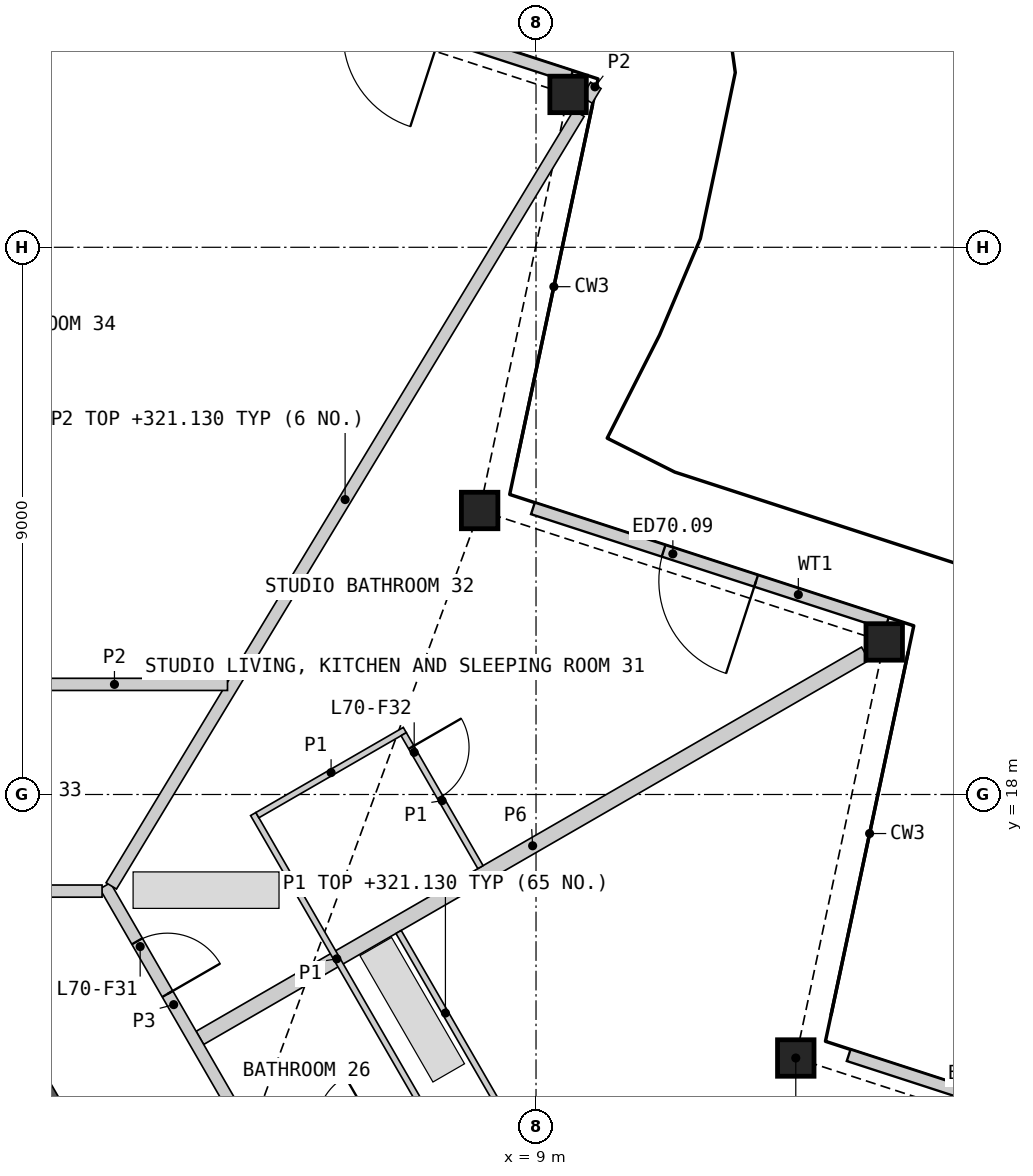
"""IFC4 building model, lengths in metres.
Left out: names, types, materials, properties, quantities, classifications, styles, units other than length and angle.
Written with IfcOpenShell. Run it as: python <this file> out.ifc"""

import sys

from ifc_helpers import new_model, si_unit, direction, frame, frame_2d, origin, origin_2d, place, context, subcontext, project, spatial, rectangle, hollow_rectangle, extrude, element, fill, save


model = new_model("IFC4")
c1 = context("Model", 3, precision=1e-05, world=origin(), true_north=direction((0.0, 1.0)))
c2 = subcontext(c1, "Body", "Model", "MODEL_VIEW")
j1 = project(units=[si_unit("LENGTHUNIT", "METRE"), si_unit("PLANEANGLEUNIT", "RADIAN")], contexts=[c1])
p1 = place(None, origin())
s1 = spatial("IfcSite", under=j1, at=p1, CompositionType="ELEMENT")
p2 = place(p1, origin())
s2 = spatial("IfcBuilding", under=s1, at=p2, CompositionType="ELEMENT")
p3 = place(p2, frame((0.0, 0.0, 318.8)))
s3 = spatial("IfcBuildingStorey", under=s2, at=p3, CompositionType="ELEMENT", Elevation=318.8)
for number, where, z_axis, x_axis in (
    (1, (13.272, 13.666, 0.0), (0.0, 0.0, 1.0), (1.0, 0.0, 0.0)),
    (2, (14.727, 20.509, 0.0), (0.0, 0.0, 1.0), (1.0, 0.0, 0.0)),
    (3, (8.073, 22.671, 0.0), (0.0, 0.0, 1.0), (1.0, 0.0, 0.0)),
    (4, (9.527, 29.514, 0.0), (0.0, 0.0, 1.0), (1.0, 0.0, 0.0)),
):
    element("IfcColumn", number, at=place(p3, frame(where, z_axis=z_axis, x_axis=x_axis)), inside=s3, PredefinedType="COLUMN", context=c2, shape_type="SweptSolid", body=[
        extrude(hollow_rectangle(XDim=0.6, YDim=0.6, WallThickness=0.04, at=origin_2d()), origin(), (0.0, 0.0, 1.0), 3.4),
    ])
p4 = place(p3, frame((19.962, 11.82, 0.0), z_axis=(0.0, 0.0, 1.0), x_axis=(-0.951053709789, 0.309025631781, 0.0)))
e5 = element("IfcWall", 5, at=p4, inside=s3, PredefinedType="SOLIDWALL", context=c2, shape_type="SweptSolid", body=[
    extrude(rectangle(XDim=6.12, YDim=0.2, at=frame_2d((3.06, 0.0))), origin(), (0.0, 0.0, 1.0), 2.488),
])
p5 = place(p4, frame((2.26, 0.0, 0.0)))
e6 = element("IfcOpeningElement", 6, at=p5, cuts=e5, PredefinedType="OPENING", context=c2, shape_type="SweptSolid", body=[
    extrude(rectangle(XDim=1.6, YDim=2.25, at=frame_2d((0.8, 1.125))), frame((0.0, 0.11, 0.0), z_axis=(0.0, -1.0, 0.0), x_axis=(1.0, 0.0, 0.0)), (0.0, 0.0, 1.0), 0.22),
])
p6 = place(p3, frame((14.769, 20.814, 0.0), z_axis=(0.0, 0.0, 1.0), x_axis=(-0.951069243123, 0.308977822483, 0.0)))
e7 = element("IfcWall", 7, at=p6, inside=s3, PredefinedType="SOLIDWALL", context=c2, shape_type="SweptSolid", body=[
    extrude(rectangle(XDim=6.12, YDim=0.2, at=frame_2d((3.06, 0.0))), origin(), (0.0, 0.0, 1.0), 2.488),
])
p7 = place(p6, frame((2.26, 0.0, 0.0)))
e8 = element("IfcOpeningElement", 8, at=p7, cuts=e7, PredefinedType="OPENING", context=c2, shape_type="SweptSolid", body=[
    extrude(rectangle(XDim=1.6, YDim=2.25, at=frame_2d((0.8, 1.125))), frame((0.0, 0.11, 0.0), z_axis=(0.0, -1.0, 0.0), x_axis=(1.0, 0.0, 0.0)), (0.0, 0.0, 1.0), 0.22),
])
p8 = place(p3, frame((9.576, 29.809, 0.0), z_axis=(0.0, 0.0, 1.0), x_axis=(-0.951053709789, 0.309025631781, 0.0)))
e9 = element("IfcWall", 9, at=p8, inside=s3, PredefinedType="SOLIDWALL", context=c2, shape_type="SweptSolid", body=[
    extrude(rectangle(XDim=6.12, YDim=0.2, at=frame_2d((3.06, 0.0))), origin(), (0.0, 0.0, 1.0), 2.488),
])
p9 = place(p8, frame((2.26, 0.0, 0.0)))
e10 = element("IfcOpeningElement", 10, at=p9, cuts=e9, PredefinedType="OPENING", context=c2, shape_type="SweptSolid", body=[
    extrude(rectangle(XDim=1.6, YDim=2.25, at=frame_2d((0.8, 1.125))), frame((0.0, 0.11, 0.0), z_axis=(0.0, -1.0, 0.0), x_axis=(1.0, 0.0, 0.0)), (0.0, 0.0, 1.0), 0.22),
])
p10 = place(p3, frame((2.361, 10.322, 0.0), z_axis=(0.0, 0.0, 1.0), x_axis=(-0.500000735859, 0.866024978935, 0.0)))
e11 = element("IfcWall", 11, at=p10, inside=s3, PredefinedType="SHEAR", context=c2, shape_type="SweptSolid", body=[
    extrude(rectangle(XDim=4.202, YDim=0.6, at=frame_2d((2.101, 0.0))), origin(), (0.0, 0.0, 1.0), 3.1),
])
p11 = place(p3, frame((3.472, 13.997, 0.0), z_axis=(0.0, 0.0, 1.0), x_axis=(0.866029233976, 0.499993365855, 0.0)))
e12 = element("IfcWall", 12, at=p11, inside=s3, PredefinedType="PARTITIONING", context=c2, shape_type="SweptSolid", body=[
    extrude(rectangle(XDim=12.637, YDim=0.25, at=frame_2d((6.319, 0.0))), origin(), (0.0, 0.0, 1.0), 2.33),
])
p12 = place(p3, frame((1.913, 16.498, 0.0), z_axis=(0.0, 0.0, 1.0), x_axis=(0.499950370306, -0.866054055606, 0.0)))
e13 = element("IfcWall", 13, at=p12, inside=s3, PredefinedType="PARTITIONING", context=c2, shape_type="SweptSolid", body=[
    extrude(rectangle(XDim=4.513, YDim=0.2, at=frame_2d((2.256, 0.0))), origin(), (0.0, 0.0, 1.0), 3.1),
])
p13 = place(p12, frame((1.053, 0.0, 0.0)))
e14 = element("IfcOpeningElement", 14, at=p13, cuts=e13, PredefinedType="OPENING", context=c2, shape_type="SweptSolid", body=[
    extrude(rectangle(XDim=1.0, YDim=2.1, at=frame_2d((0.5, 1.05))), frame((0.0, 0.11, 0.0), z_axis=(0.0, -1.0, 0.0), x_axis=(1.0, 0.0, 0.0)), (0.0, 0.0, 1.0), 0.22),
])
p14 = place(p3, frame((-1.863, 16.411, 0.0), z_axis=(0.0, 0.0, 1.0), x_axis=(1.0, 0.0, 0.0)))
e15 = element("IfcWall", 15, at=p14, inside=s3, PredefinedType="PARTITIONING", context=c2, shape_type="SweptSolid", body=[
    extrude(rectangle(XDim=3.726, YDim=0.2, at=frame_2d((1.863, 0.0))), origin(), (0.0, 0.0, 1.0), 3.1),
])
p15 = place(p14, frame((1.388, 0.0, 0.0)))
e16 = element("IfcOpeningElement", 16, at=p15, cuts=e15, PredefinedType="OPENING", context=c2, shape_type="SweptSolid", body=[
    extrude(rectangle(XDim=0.95, YDim=2.1, at=frame_2d((0.475, 1.05))), frame((0.0, 0.11, 0.0), z_axis=(0.0, -1.0, 0.0), x_axis=(1.0, 0.0, 0.0)), (0.0, 0.0, 1.0), 0.22),
])
p16 = place(p3, frame((2.015, 16.497, 0.0), z_axis=(0.0, 0.0, 1.0), x_axis=(0.517779253395, 0.855514257482, 0.0)))
e17 = element("IfcWall", 17, at=p16, inside=s3, PredefinedType="PARTITIONING", context=c2, shape_type="SweptSolid", body=[
    extrude(rectangle(XDim=14.854, YDim=0.2, at=frame_2d((7.427, 0.0))), origin(), (0.0, 0.0, 1.0), 2.33),
])
p17 = place(p3, frame((0.208, 19.811, 0.0), z_axis=(0.0, 0.0, 1.0), x_axis=(1.0, 0.0, 0.0)))
e18 = element("IfcWall", 18, at=p17, inside=s3, PredefinedType="PARTITIONING", context=c2, shape_type="SweptSolid", body=[
    extrude(rectangle(XDim=3.718, YDim=0.2, at=frame_2d((1.859, 0.0))), origin(), (0.0, 0.0, 1.0), 2.33),
])
p18 = place(p3, frame((9.837, 29.422, 0.0), z_axis=(0.0, 0.0, 1.0), x_axis=(0.517419338909, 0.855731983581, 0.0)))
e19 = element("IfcWall", 19, at=p18, inside=s3, PredefinedType="PARTITIONING", context=c2, shape_type="SweptSolid", body=[
    extrude(rectangle(XDim=0.282, YDim=0.2, at=frame_2d((0.141, 0.0))), origin(), (0.0, 0.0, 1.0), 2.33),
])
p19 = place(p3, frame((6.74, 15.739, 0.0), z_axis=(0.0, 0.0, 1.0), x_axis=(0.499995022685, -0.86602827742, 0.0)))
e20 = element("IfcWall", 20, at=p19, inside=s3, PredefinedType="PARTITIONING", context=c2, shape_type="SweptSolid", body=[
    extrude(rectangle(XDim=15.404, YDim=0.1, at=frame_2d((7.702, 0.0))), origin(), (0.0, 0.0, 1.0), 2.33),
])
p20 = place(p19, frame((8.582, 0.0, 0.0)))
e21 = element("IfcOpeningElement", 21, at=p20, cuts=e20, PredefinedType="OPENING", context=c2, shape_type="SweptSolid", body=[
    extrude(rectangle(XDim=0.95, YDim=2.1, at=frame_2d((0.475, 1.05))), frame((0.0, 0.06, 0.0), z_axis=(0.0, -1.0, 0.0), x_axis=(1.0, 0.0, 0.0)), (0.0, 0.0, 1.0), 0.12),
])
p21 = place(p3, frame((4.349, 17.679, 0.0), z_axis=(0.0, 0.0, 1.0), x_axis=(0.49997732567, -0.866038494419, 0.0)))
e22 = element("IfcWall", 22, at=p21, inside=s3, PredefinedType="PARTITIONING", context=c2, shape_type="SweptSolid", body=[
    extrude(rectangle(XDim=5.5, YDim=0.1, at=frame_2d((2.75, 0.0))), origin(), (0.0, 0.0, 1.0), 2.33),
])
p22 = place(p3, frame((4.417, 17.66, 0.0), z_axis=(0.0, 0.0, 1.0), x_axis=(0.866034573852, 0.49998411664, 0.0)))
e23 = element("IfcWall", 23, at=p22, inside=s3, PredefinedType="PARTITIONING", context=c2, shape_type="SweptSolid", body=[
    extrude(rectangle(XDim=2.8, YDim=0.1, at=frame_2d((1.4, 0.0))), origin(), (0.0, 0.0, 1.0), 2.33),
])
p23 = place(p3, frame((6.824, 18.992, 0.0), z_axis=(0.0, 0.0, 1.0), x_axis=(0.50001820224, -0.866014894461, 0.0)))
e24 = element("IfcWall", 24, at=p23, inside=s3, PredefinedType="PARTITIONING", context=c2, shape_type="SweptSolid", body=[
    extrude(rectangle(XDim=2.525, YDim=0.1, at=frame_2d((1.262, 0.0))), origin(), (0.0, 0.0, 1.0), 2.33),
])
p24 = place(p23, frame((0.25, 0.0, 0.0)))
e25 = element("IfcOpeningElement", 25, at=p24, cuts=e24, PredefinedType="OPENING", context=c2, shape_type="SweptSolid", body=[
    extrude(rectangle(XDim=0.95, YDim=2.1, at=frame_2d((0.475, 1.05))), frame((0.0, 0.06, 0.0), z_axis=(0.0, -1.0, 0.0), x_axis=(1.0, 0.0, 0.0)), (0.0, 0.0, 1.0), 0.12),
])
p25 = place(p7, origin())
e26 = element("IfcDoor", 26, at=p25, inside=s3, OperationType="DOUBLE_DOOR_SINGLE_SWING", PredefinedType="DOOR", context=c2, shape_type="SweptSolid", body=[
    extrude(rectangle(XDim=1.6, YDim=2.25, at=frame_2d((0.8, 1.125))), frame((0.0, 0.025, 0.0), z_axis=(0.0, -1.0, 0.0), x_axis=(1.0, 0.0, 0.0)), (0.0, 0.0, 1.0), 0.05),
])
fill(e8, e26)
p26 = place(p13, origin())
e27 = element("IfcDoor", 27, at=p26, inside=s3, OperationType="SINGLE_SWING_RIGHT", PredefinedType="DOOR", context=c2, shape_type="SweptSolid", body=[
    extrude(rectangle(XDim=1.0, YDim=2.1, at=frame_2d((0.5, 1.05))), frame((0.0, 0.025, 0.0), z_axis=(0.0, -1.0, 0.0), x_axis=(1.0, 0.0, 0.0)), (0.0, 0.0, 1.0), 0.05),
])
fill(e14, e27)
p27 = place(p24, origin())
e28 = element("IfcDoor", 28, at=p27, inside=s3, OperationType="SINGLE_SWING_LEFT", PredefinedType="DOOR", context=c2, shape_type="SweptSolid", body=[
    extrude(rectangle(XDim=0.95, YDim=2.1, at=frame_2d((0.475, 1.05))), frame((0.0, 0.025, 0.0), z_axis=(0.0, -1.0, 0.0), x_axis=(1.0, 0.0, 0.0)), (0.0, 0.0, 1.0), 0.05),
])
fill(e25, e28)
save(model, sys.argv[1])
